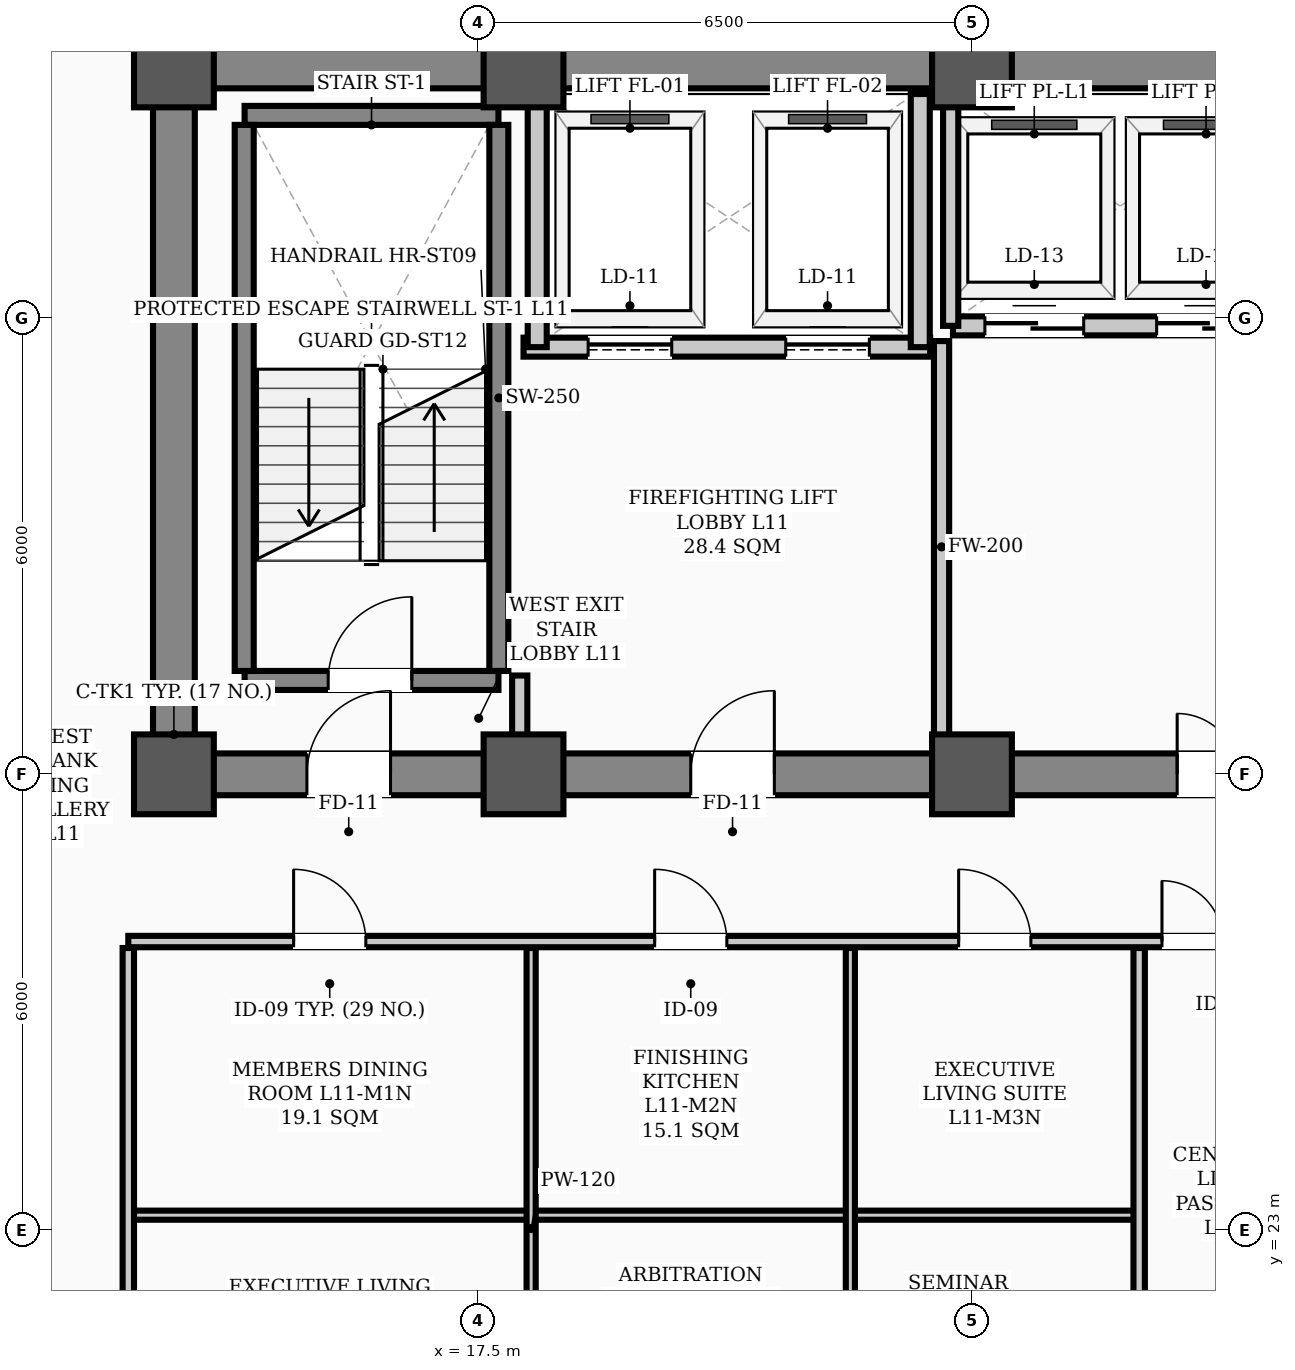
"""IFC4 building model, lengths in metres.
Left out: names, types, materials, properties, quantities, classifications, styles, units other than length and angle.
Written with IfcOpenShell. Run it as: python <this file> out.ifc"""

import sys

from ifc_helpers import new_model, si_unit, direction, frame, frame_2d, origin, origin_2d, place, context, subcontext, project, spatial, rectangle, hollow_rectangle, extrude, element, fill, save


model = new_model("IFC4")
c1 = context("Model", 3, precision=1e-05, world=origin(), true_north=direction((0.0, 1.0)))
c2 = subcontext(c1, "Body", "Model", "MODEL_VIEW")
j1 = project(units=[si_unit("LENGTHUNIT", "METRE"), si_unit("PLANEANGLEUNIT", "RADIAN")], contexts=[c1])
p1 = place(None, origin())
s1 = spatial("IfcSite", under=j1, at=p1, CompositionType="ELEMENT")
p2 = place(p1, origin())
s2 = spatial("IfcBuilding", under=s1, at=p2, CompositionType="ELEMENT")
p3 = place(p2, frame((0.0, 0.0, 46.0)))
s3 = spatial("IfcBuildingStorey", under=s2, at=p3, CompositionType="ELEMENT", Elevation=46.0)
for number, where, z_axis, x_axis in (
    (1, (13.5, 29.0, 0.0), (0.0, 0.0, 1.0), (1.0, 0.0, 0.0)),
    (2, (13.5, 38.3, 0.0), (0.0, 0.0, 1.0), (1.0, 0.0, 0.0)),
    (3, (18.1, 29.0, 0.0), (0.0, 0.0, 1.0), (1.0, 0.0, 0.0)),
    (4, (18.1, 38.3, 0.0), (0.0, 0.0, 1.0), (1.0, 0.0, 0.0)),
    (5, (24.0, 29.0, 0.0), (0.0, 0.0, 1.0), (1.0, 0.0, 0.0)),
    (6, (24.0, 38.3, 0.0), (0.0, 0.0, 1.0), (1.0, 0.0, 0.0)),
):
    element("IfcColumn", number, at=place(p3, frame(where, z_axis=z_axis, x_axis=x_axis)), inside=s3, PredefinedType="COLUMN", context=c2, shape_type="SweptSolid", body=[
        extrude(hollow_rectangle(XDim=1.05, YDim=1.05, WallThickness=0.038, InnerFilletRadius=0.019, OuterFilletRadius=0.057, at=origin_2d()), origin(), (0.0, 0.0, 1.0), 3.9),
    ])
p4 = place(p3, frame((13.5, 29.0, 0.0), z_axis=(0.0, 0.0, 1.0), x_axis=(1.0, 0.0, 0.0)))
e7 = element("IfcWall", 7, at=p4, inside=s3, PredefinedType="SHEAR", context=c2, shape_type="SweptSolid", body=[
    extrude(rectangle(XDim=30.5, YDim=0.55, at=frame_2d((15.25, 0.0))), origin(), (0.0, 0.0, 1.0), 3.72),
])
p5 = place(p4, frame((1.75, 0.0, 0.0)))
e8 = element("IfcOpeningElement", 8, at=p5, cuts=e7, PredefinedType="OPENING", context=c2, shape_type="SweptSolid", body=[
    extrude(rectangle(XDim=1.1, YDim=2.08, at=frame_2d((0.55, 1.04))), frame((0.0, 0.285, 0.0), z_axis=(0.0, -1.0, 0.0), x_axis=(1.0, 0.0, 0.0)), (0.0, 0.0, 1.0), 0.57),
])
p6 = place(p4, frame((26.7, 0.0, 0.0)))
e9 = element("IfcOpeningElement", 9, at=p6, cuts=e7, PredefinedType="OPENING", context=c2, shape_type="SweptSolid", body=[
    extrude(rectangle(XDim=1.1, YDim=2.08, at=frame_2d((0.55, 1.04))), frame((0.0, 0.285, 0.0), z_axis=(0.0, -1.0, 0.0), x_axis=(1.0, 0.0, 0.0)), (0.0, 0.0, 1.0), 0.57),
])
p7 = place(p4, frame((6.8, 0.0, 0.0)))
e10 = element("IfcOpeningElement", 10, at=p7, cuts=e7, PredefinedType="OPENING", context=c2, shape_type="SweptSolid", body=[
    extrude(rectangle(XDim=1.1, YDim=2.08, at=frame_2d((0.55, 1.04))), frame((0.0, 0.285, 0.0), z_axis=(0.0, -1.0, 0.0), x_axis=(1.0, 0.0, 0.0)), (0.0, 0.0, 1.0), 0.57),
])
p8 = place(p4, frame((13.2, 0.0, 0.0)))
e11 = element("IfcOpeningElement", 11, at=p8, cuts=e7, PredefinedType="OPENING", context=c2, shape_type="SweptSolid", body=[
    extrude(rectangle(XDim=1.6, YDim=2.08, at=frame_2d((0.8, 1.04))), frame((0.0, 0.285, 0.0), z_axis=(0.0, -1.0, 0.0), x_axis=(1.0, 0.0, 0.0)), (0.0, 0.0, 1.0), 0.57),
])
p9 = place(p4, frame((19.6, 0.0, 0.0)))
e12 = element("IfcOpeningElement", 12, at=p9, cuts=e7, PredefinedType="OPENING", context=c2, shape_type="SweptSolid", body=[
    extrude(rectangle(XDim=0.9, YDim=2.08, at=frame_2d((0.45, 1.04))), frame((0.0, 0.285, 0.0), z_axis=(0.0, -1.0, 0.0), x_axis=(1.0, 0.0, 0.0)), (0.0, 0.0, 1.0), 0.57),
])
p10 = place(p4, frame((21.6, 0.0, 0.0)))
e13 = element("IfcOpeningElement", 13, at=p10, cuts=e7, PredefinedType="OPENING", context=c2, shape_type="SweptSolid", body=[
    extrude(rectangle(XDim=0.9, YDim=2.08, at=frame_2d((0.45, 1.04))), frame((0.0, 0.285, 0.0), z_axis=(0.0, -1.0, 0.0), x_axis=(1.0, 0.0, 0.0)), (0.0, 0.0, 1.0), 0.57),
])
p11 = place(p3, frame((13.5, 38.3, 0.0), z_axis=(0.0, 0.0, 1.0), x_axis=(1.0, 0.0, 0.0)))
e14 = element("IfcWall", 14, at=p11, inside=s3, PredefinedType="SHEAR", context=c2, shape_type="SweptSolid", body=[
    extrude(rectangle(XDim=30.5, YDim=0.55, at=frame_2d((15.25, 0.0))), origin(), (0.0, 0.0, 1.0), 3.72),
])
p12 = place(p3, frame((13.5, 29.35, 0.0), z_axis=(0.0, 0.0, 1.0), x_axis=(0.0, 1.0, 0.0)))
e15 = element("IfcWall", 15, at=p12, inside=s3, PredefinedType="SHEAR", context=c2, shape_type="SweptSolid", body=[
    extrude(rectangle(XDim=8.6, YDim=0.55, at=frame_2d((4.3, 0.0))), origin(), (0.0, 0.0, 1.0), 3.72),
])
p13 = place(p3, frame((14.43, 30.235, 0.0), z_axis=(0.0, 0.0, 1.0), x_axis=(1.0, 0.0, 0.0)))
e16 = element("IfcWall", 16, at=p13, inside=s3, PredefinedType="STANDARD", context=c2, shape_type="SweptSolid", body=[
    extrude(rectangle(XDim=3.34, YDim=0.25, at=frame_2d((1.67, 0.0))), origin(), (0.0, 0.0, 1.0), 3.72),
])
p14 = place(p13, frame((1.1, 0.0, 0.0)))
e17 = element("IfcOpeningElement", 17, at=p14, cuts=e16, PredefinedType="OPENING", context=c2, shape_type="SweptSolid", body=[
    extrude(rectangle(XDim=1.1, YDim=2.08, at=frame_2d((0.55, 1.04))), frame((0.0, 0.135, 0.0), z_axis=(0.0, -1.0, 0.0), x_axis=(1.0, 0.0, 0.0)), (0.0, 0.0, 1.0), 0.27),
])
p15 = place(p3, frame((14.43, 37.669, 0.0), z_axis=(0.0, 0.0, 1.0), x_axis=(1.0, 0.0, 0.0)))
e18 = element("IfcWall", 18, at=p15, inside=s3, PredefinedType="STANDARD", context=c2, shape_type="SweptSolid", body=[
    extrude(rectangle(XDim=3.34, YDim=0.25, at=frame_2d((1.67, 0.0))), origin(), (0.0, 0.0, 1.0), 3.72),
])
for number, where, z_axis, x_axis in (
    (19, (14.425, 30.36, 0.0), (0.0, 0.0, 1.0), (0.0, 1.0, 0.0)),
    (20, (17.775, 30.36, 0.0), (0.0, 0.0, 1.0), (0.0, 1.0, 0.0)),
):
    element("IfcWall", number, at=place(p3, frame(where, z_axis=z_axis, x_axis=x_axis)), inside=s3, PredefinedType="STANDARD", context=c2, shape_type="SweptSolid", body=[
        extrude(rectangle(XDim=7.184, YDim=0.25, at=frame_2d((3.592, 0.0))), origin(), (0.0, 0.0, 1.0), 3.72),
    ])
p16 = place(p3, frame((18.1, 34.62, 0.0), z_axis=(0.0, 0.0, 1.0), x_axis=(1.0, 0.0, 0.0)))
e21 = element("IfcWall", 21, at=p16, inside=s3, PredefinedType="STANDARD", context=c2, shape_type="SweptSolid", body=[
    extrude(rectangle(XDim=5.35, YDim=0.25, at=frame_2d((2.675, 0.0))), origin(), (0.0, 0.0, 1.0), 3.72),
])
p17 = place(p16, frame((0.85, 0.0, 0.0)))
e22 = element("IfcOpeningElement", 22, at=p17, cuts=e21, PredefinedType="OPENING", context=c2, shape_type="SweptSolid", body=[
    extrude(rectangle(XDim=1.1, YDim=2.08, at=frame_2d((0.55, 1.04))), frame((0.0, 0.135, 0.0), z_axis=(0.0, -1.0, 0.0), x_axis=(1.0, 0.0, 0.0)), (0.0, 0.0, 1.0), 0.27),
])
p18 = place(p16, frame((3.45, 0.0, 0.0)))
e23 = element("IfcOpeningElement", 23, at=p18, cuts=e21, PredefinedType="OPENING", context=c2, shape_type="SweptSolid", body=[
    extrude(rectangle(XDim=1.1, YDim=2.08, at=frame_2d((0.55, 1.04))), frame((0.0, 0.135, 0.0), z_axis=(0.0, -1.0, 0.0), x_axis=(1.0, 0.0, 0.0)), (0.0, 0.0, 1.0), 0.27),
])
for number, where, z_axis, x_axis in (
    (24, (18.28, 34.62, 0.0), (0.0, 0.0, 1.0), (0.0, 1.0, 0.0)),
    (25, (23.32, 34.62, 0.0), (0.0, 0.0, 1.0), (0.0, 1.0, 0.0)),
):
    element("IfcWall", number, at=place(p3, frame(where, z_axis=z_axis, x_axis=x_axis)), inside=s3, PredefinedType="STANDARD", context=c2, shape_type="SweptSolid", body=[
        extrude(rectangle(XDim=3.33, YDim=0.25, at=frame_2d((1.665, 0.0))), origin(), (0.0, 0.0, 1.0), 3.3),
    ])
p19 = place(p3, frame((23.75, 34.9, 0.0), z_axis=(0.0, 0.0, 1.0), x_axis=(1.0, 0.0, 0.0)))
e26 = element("IfcWall", 26, at=p19, inside=s3, PredefinedType="STANDARD", context=c2, shape_type="SweptSolid", body=[
    extrude(rectangle(XDim=4.4, YDim=0.25, at=frame_2d((2.2, 0.0))), origin(), (0.0, 0.0, 1.0), 3.72),
])
p20 = place(p19, frame((0.42, 0.0, 0.0)))
e27 = element("IfcOpeningElement", 27, at=p20, cuts=e26, PredefinedType="OPENING", context=c2, shape_type="SweptSolid", body=[
    extrude(rectangle(XDim=1.3, YDim=2.08, at=frame_2d((0.65, 1.04))), frame((0.0, 0.135, 0.0), z_axis=(0.0, -1.0, 0.0), x_axis=(1.0, 0.0, 0.0)), (0.0, 0.0, 1.0), 0.27),
])
p21 = place(p19, frame((2.68, 0.0, 0.0)))
e28 = element("IfcOpeningElement", 28, at=p21, cuts=e26, PredefinedType="OPENING", context=c2, shape_type="SweptSolid", body=[
    extrude(rectangle(XDim=1.3, YDim=2.08, at=frame_2d((0.65, 1.04))), frame((0.0, 0.135, 0.0), z_axis=(0.0, -1.0, 0.0), x_axis=(1.0, 0.0, 0.0)), (0.0, 0.0, 1.0), 0.27),
])
p22 = place(p3, frame((12.9, 26.8, 0.0), z_axis=(0.0, 0.0, 1.0), x_axis=(1.0, 0.0, 0.0)))
e29 = element("IfcWall", 29, at=p22, inside=s3, PredefinedType="PARTITIONING", context=c2, shape_type="SweptSolid", body=[
    extrude(rectangle(XDim=31.7, YDim=0.15, at=frame_2d((15.85, 0.0))), origin(), (0.0, 0.0, 1.0), 3.1),
])
p23 = place(p22, frame((13.6, 0.0, 0.0)))
e30 = element("IfcOpeningElement", 30, at=p23, cuts=e29, PredefinedType="OPENING", context=c2, shape_type="SweptSolid", body=[
    extrude(rectangle(XDim=1.6, YDim=2.08, at=frame_2d((0.8, 1.04))), frame((0.0, 0.085, 0.0), z_axis=(0.0, -1.0, 0.0), x_axis=(1.0, 0.0, 0.0)), (0.0, 0.0, 1.0), 0.17),
])
p24 = place(p22, frame((2.175, 0.0, 0.0)))
e31 = element("IfcOpeningElement", 31, at=p24, cuts=e29, PredefinedType="OPENING", context=c2, shape_type="SweptSolid", body=[
    extrude(rectangle(XDim=0.95, YDim=2.08, at=frame_2d((0.475, 1.04))), frame((0.0, 0.085, 0.0), z_axis=(0.0, -1.0, 0.0), x_axis=(1.0, 0.0, 0.0)), (0.0, 0.0, 1.0), 0.17),
])
p25 = place(p22, frame((6.925, 0.0, 0.0)))
e32 = element("IfcOpeningElement", 32, at=p25, cuts=e29, PredefinedType="OPENING", context=c2, shape_type="SweptSolid", body=[
    extrude(rectangle(XDim=0.95, YDim=2.08, at=frame_2d((0.475, 1.04))), frame((0.0, 0.085, 0.0), z_axis=(0.0, -1.0, 0.0), x_axis=(1.0, 0.0, 0.0)), (0.0, 0.0, 1.0), 0.17),
])
p26 = place(p22, frame((10.925, 0.0, 0.0)))
e33 = element("IfcOpeningElement", 33, at=p26, cuts=e29, PredefinedType="OPENING", context=c2, shape_type="SweptSolid", body=[
    extrude(rectangle(XDim=0.95, YDim=2.08, at=frame_2d((0.475, 1.04))), frame((0.0, 0.085, 0.0), z_axis=(0.0, -1.0, 0.0), x_axis=(1.0, 0.0, 0.0)), (0.0, 0.0, 1.0), 0.17),
])
p27 = place(p22, frame((16.025, 0.0, 0.0)))
e34 = element("IfcOpeningElement", 34, at=p27, cuts=e29, PredefinedType="OPENING", context=c2, shape_type="SweptSolid", body=[
    extrude(rectangle(XDim=0.95, YDim=2.08, at=frame_2d((0.475, 1.04))), frame((0.0, 0.085, 0.0), z_axis=(0.0, -1.0, 0.0), x_axis=(1.0, 0.0, 0.0)), (0.0, 0.0, 1.0), 0.17),
])
p28 = place(p22, frame((21.725, 0.0, 0.0)))
e35 = element("IfcOpeningElement", 35, at=p28, cuts=e29, PredefinedType="OPENING", context=c2, shape_type="SweptSolid", body=[
    extrude(rectangle(XDim=0.95, YDim=2.08, at=frame_2d((0.475, 1.04))), frame((0.0, 0.085, 0.0), z_axis=(0.0, -1.0, 0.0), x_axis=(1.0, 0.0, 0.0)), (0.0, 0.0, 1.0), 0.17),
])
p29 = place(p22, frame((27.925, 0.0, 0.0)))
e36 = element("IfcOpeningElement", 36, at=p29, cuts=e29, PredefinedType="OPENING", context=c2, shape_type="SweptSolid", body=[
    extrude(rectangle(XDim=0.95, YDim=2.08, at=frame_2d((0.475, 1.04))), frame((0.0, 0.085, 0.0), z_axis=(0.0, -1.0, 0.0), x_axis=(1.0, 0.0, 0.0)), (0.0, 0.0, 1.0), 0.17),
])
p30 = place(p3, frame((12.9, 23.2, 0.0), z_axis=(0.0, 0.0, 1.0), x_axis=(1.0, 0.0, 0.0)))
e37 = element("IfcWall", 37, at=p30, inside=s3, PredefinedType="PARTITIONING", context=c2, shape_type="SweptSolid", body=[
    extrude(rectangle(XDim=5.3, YDim=0.12, at=frame_2d((2.65, 0.0))), origin(), (0.0, 0.0, 1.0), 3.1),
])
p31 = place(p3, frame((18.2, 23.2, 0.0), z_axis=(0.0, 0.0, 1.0), x_axis=(1.0, 0.0, 0.0)))
e38 = element("IfcWall", 38, at=p31, inside=s3, PredefinedType="PARTITIONING", context=c2, shape_type="SweptSolid", body=[
    extrude(rectangle(XDim=4.2, YDim=0.12, at=frame_2d((2.1, 0.0))), origin(), (0.0, 0.0, 1.0), 3.3),
])
p32 = place(p3, frame((22.4, 23.2, 0.0), z_axis=(0.0, 0.0, 1.0), x_axis=(1.0, 0.0, 0.0)))
e39 = element("IfcWall", 39, at=p32, inside=s3, PredefinedType="PARTITIONING", context=c2, shape_type="SweptSolid", body=[
    extrude(rectangle(XDim=3.8, YDim=0.12, at=frame_2d((1.9, 0.0))), origin(), (0.0, 0.0, 1.0), 3.1),
])
p33 = place(p3, frame((18.05, 29.285, 0.0), z_axis=(0.0, 0.0, 1.0), x_axis=(0.0, 1.0, 0.0)))
e40 = element("IfcWall", 40, at=p33, inside=s3, PredefinedType="STANDARD", context=c2, shape_type="SweptSolid", body=[
    extrude(rectangle(XDim=1.015, YDim=0.2, at=frame_2d((0.508, 0.0))), origin(), (0.0, 0.0, 1.0), 3.3),
])
p34 = place(p3, frame((23.6, 29.285, 0.0), z_axis=(0.0, 0.0, 1.0), x_axis=(0.0, 1.0, 0.0)))
e41 = element("IfcWall", 41, at=p34, inside=s3, PredefinedType="STANDARD", context=c2, shape_type="SweptSolid", body=[
    extrude(rectangle(XDim=5.415, YDim=0.2, at=frame_2d((2.708, 0.0))), origin(), (0.0, 0.0, 1.0), 3.1),
])
for number, where, z_axis, x_axis in (
    (42, (26.2, 19.335, 0.0), (0.0, 0.0, 1.0), (0.0, 1.0, 0.0)),
    (43, (12.9, 19.335, 0.0), (0.0, 0.0, 1.0), (0.0, 1.0, 0.0)),
):
    element("IfcWall", number, at=place(p3, frame(where, z_axis=z_axis, x_axis=x_axis)), inside=s3, PredefinedType="PARTITIONING", context=c2, shape_type="SweptSolid", body=[
        extrude(rectangle(XDim=7.38, YDim=0.15, at=frame_2d((3.69, 0.0))), origin(), (0.0, 0.0, 1.0), 3.0),
    ])
for number, where, z_axis, x_axis in (
    (44, (18.2, 19.335, 0.0), (0.0, 0.0, 1.0), (0.0, 1.0, 0.0)),
    (45, (22.4, 19.335, 0.0), (0.0, 0.0, 1.0), (0.0, 1.0, 0.0)),
):
    element("IfcWall", number, at=place(p3, frame(where, z_axis=z_axis, x_axis=x_axis)), inside=s3, PredefinedType="PARTITIONING", context=c2, shape_type="SweptSolid", body=[
        extrude(rectangle(XDim=7.38, YDim=0.12, at=frame_2d((3.69, 0.0))), origin(), (0.0, 0.0, 1.0), 3.0),
    ])
p35 = place(p3, frame((23.72, 34.9, 0.0), z_axis=(0.0, 0.0, 1.0), x_axis=(0.0, 1.0, 0.0)))
e46 = element("IfcWall", 46, at=p35, inside=s3, PredefinedType="STANDARD", context=c2, shape_type="SweptSolid", body=[
    extrude(rectangle(XDim=3.12, YDim=0.2, at=frame_2d((1.56, 0.0))), origin(), (0.0, 0.0, 1.0), 3.1),
])
p36 = place(p14, origin())
e47 = element("IfcDoor", 47, at=p36, inside=s3, OperationType="SINGLE_SWING_RIGHT", PredefinedType="DOOR", context=c2, shape_type="SweptSolid", body=[
    extrude(rectangle(XDim=1.1, YDim=2.08, at=frame_2d((0.55, 1.04))), frame((0.0, 0.025, 0.0), z_axis=(0.0, -1.0, 0.0), x_axis=(1.0, 0.0, 0.0)), (0.0, 0.0, 1.0), 0.05),
])
fill(e17, e47)
p37 = place(p5, origin())
e48 = element("IfcDoor", 48, at=p37, inside=s3, OperationType="SINGLE_SWING_RIGHT", PredefinedType="DOOR", context=c2, shape_type="SweptSolid", body=[
    extrude(rectangle(XDim=1.1, YDim=2.08, at=frame_2d((0.55, 1.04))), frame((0.0, 0.025, 0.0), z_axis=(0.0, -1.0, 0.0), x_axis=(1.0, 0.0, 0.0)), (0.0, 0.0, 1.0), 0.05),
])
fill(e8, e48)
p38 = place(p7, origin())
e49 = element("IfcDoor", 49, at=p38, inside=s3, OperationType="SINGLE_SWING_RIGHT", PredefinedType="DOOR", context=c2, shape_type="SweptSolid", body=[
    extrude(rectangle(XDim=1.1, YDim=2.08, at=frame_2d((0.55, 1.04))), frame((0.0, 0.025, 0.0), z_axis=(0.0, -1.0, 0.0), x_axis=(1.0, 0.0, 0.0)), (0.0, 0.0, 1.0), 0.05),
])
fill(e10, e49)
p39 = place(p8, origin())
e50 = element("IfcDoor", 50, at=p39, inside=s3, OperationType="DOUBLE_DOOR_SINGLE_SWING", PredefinedType="DOOR", context=c2, shape_type="SweptSolid", body=[
    extrude(rectangle(XDim=1.6, YDim=2.08, at=frame_2d((0.8, 1.04))), frame((0.0, 0.025, 0.0), z_axis=(0.0, -1.0, 0.0), x_axis=(1.0, 0.0, 0.0)), (0.0, 0.0, 1.0), 0.05),
])
fill(e11, e50)
p40 = place(p23, origin())
e51 = element("IfcDoor", 51, at=p40, inside=s3, OperationType="DOUBLE_DOOR_SINGLE_SWING", PredefinedType="DOOR", context=c2, shape_type="SweptSolid", body=[
    extrude(rectangle(XDim=1.6, YDim=2.08, at=frame_2d((0.8, 1.04))), frame((0.0, 0.025, 0.0), z_axis=(0.0, -1.0, 0.0), x_axis=(1.0, 0.0, 0.0)), (0.0, 0.0, 1.0), 0.05),
])
fill(e30, e51)
p41 = place(p24, origin())
e52 = element("IfcDoor", 52, at=p41, inside=s3, OperationType="SINGLE_SWING_LEFT", PredefinedType="DOOR", context=c2, shape_type="SweptSolid", body=[
    extrude(rectangle(XDim=0.95, YDim=2.08, at=frame_2d((0.475, 1.04))), frame((0.0, 0.025, 0.0), z_axis=(0.0, -1.0, 0.0), x_axis=(1.0, 0.0, 0.0)), (0.0, 0.0, 1.0), 0.05),
])
fill(e31, e52)
p42 = place(p25, origin())
e53 = element("IfcDoor", 53, at=p42, inside=s3, OperationType="SINGLE_SWING_LEFT", PredefinedType="DOOR", context=c2, shape_type="SweptSolid", body=[
    extrude(rectangle(XDim=0.95, YDim=2.08, at=frame_2d((0.475, 1.04))), frame((0.0, 0.025, 0.0), z_axis=(0.0, -1.0, 0.0), x_axis=(1.0, 0.0, 0.0)), (0.0, 0.0, 1.0), 0.05),
])
fill(e32, e53)
p43 = place(p26, origin())
e54 = element("IfcDoor", 54, at=p43, inside=s3, OperationType="SINGLE_SWING_LEFT", PredefinedType="DOOR", context=c2, shape_type="SweptSolid", body=[
    extrude(rectangle(XDim=0.95, YDim=2.08, at=frame_2d((0.475, 1.04))), frame((0.0, 0.025, 0.0), z_axis=(0.0, -1.0, 0.0), x_axis=(1.0, 0.0, 0.0)), (0.0, 0.0, 1.0), 0.05),
])
fill(e33, e54)
p44 = place(p17, origin())
e55 = element("IfcDoor", 55, at=p44, inside=s3, OperationType="SLIDING_TO_LEFT", PredefinedType="DOOR", context=c2, shape_type="SweptSolid", body=[
    extrude(rectangle(XDim=1.1, YDim=2.08, at=frame_2d((0.55, 1.04))), frame((0.0, 0.025, 0.0), z_axis=(0.0, -1.0, 0.0), x_axis=(1.0, 0.0, 0.0)), (0.0, 0.0, 1.0), 0.05),
])
fill(e22, e55)
p45 = place(p18, origin())
e56 = element("IfcDoor", 56, at=p45, inside=s3, OperationType="SLIDING_TO_LEFT", PredefinedType="DOOR", context=c2, shape_type="SweptSolid", body=[
    extrude(rectangle(XDim=1.1, YDim=2.08, at=frame_2d((0.55, 1.04))), frame((0.0, 0.025, 0.0), z_axis=(0.0, -1.0, 0.0), x_axis=(1.0, 0.0, 0.0)), (0.0, 0.0, 1.0), 0.05),
])
fill(e23, e56)
p46 = place(p20, origin())
e57 = element("IfcDoor", 57, at=p46, inside=s3, OperationType="DOUBLE_DOOR_SLIDING", PredefinedType="DOOR", context=c2, shape_type="SweptSolid", body=[
    extrude(rectangle(XDim=1.3, YDim=2.08, at=frame_2d((0.65, 1.04))), frame((0.0, 0.025, 0.0), z_axis=(0.0, -1.0, 0.0), x_axis=(1.0, 0.0, 0.0)), (0.0, 0.0, 1.0), 0.05),
])
fill(e27, e57)
p47 = place(p21, origin())
e58 = element("IfcDoor", 58, at=p47, inside=s3, OperationType="DOUBLE_DOOR_SLIDING", PredefinedType="DOOR", context=c2, shape_type="SweptSolid", body=[
    extrude(rectangle(XDim=1.3, YDim=2.08, at=frame_2d((0.65, 1.04))), frame((0.0, 0.025, 0.0), z_axis=(0.0, -1.0, 0.0), x_axis=(1.0, 0.0, 0.0)), (0.0, 0.0, 1.0), 0.05),
])
fill(e28, e58)
save(model, sys.argv[1])
